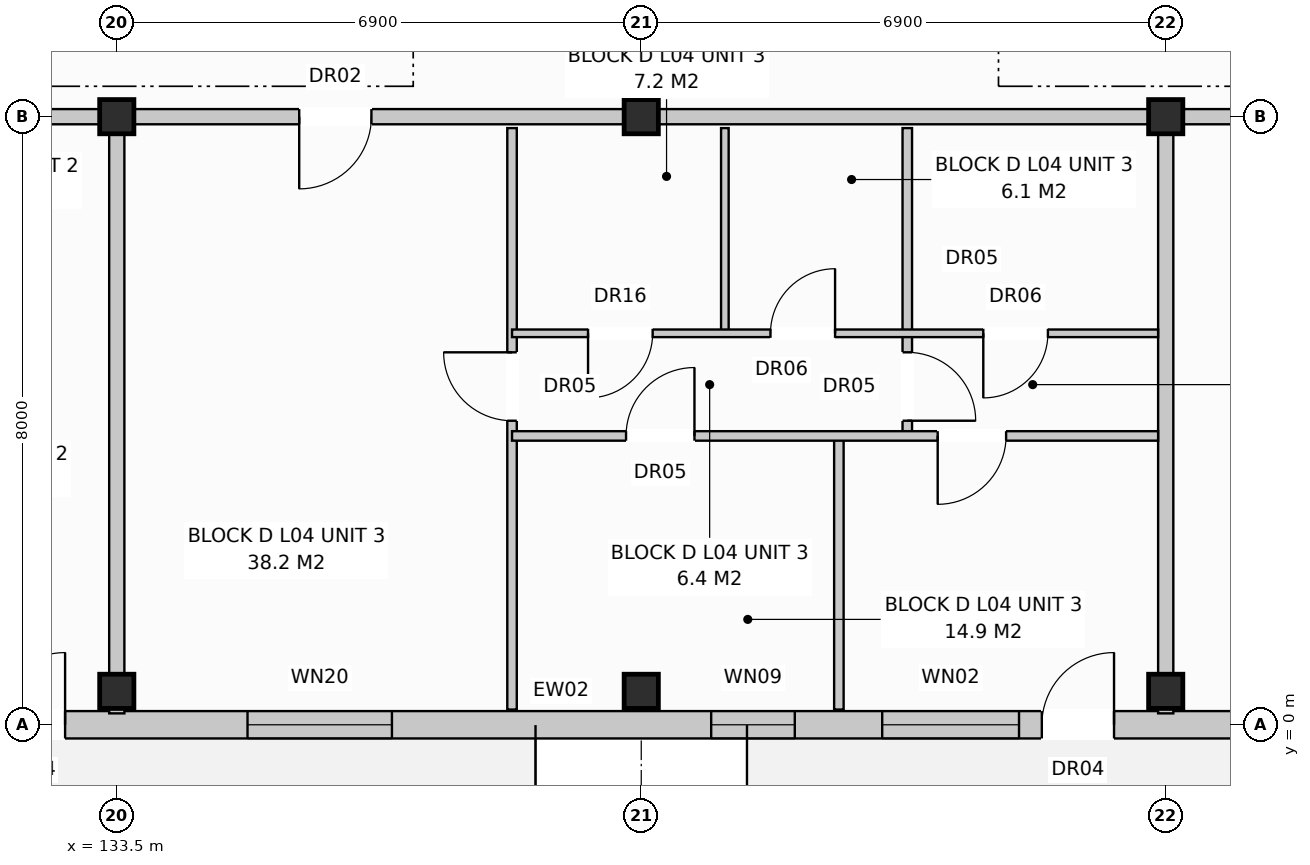
"""IFC4 building model, lengths in metres.
Left out: names, types, materials, properties, quantities, classifications, styles, units other than length and angle.
Written with IfcOpenShell. Run it as: python <this file> out.ifc"""

import sys

from ifc_helpers import new_model, si_unit, direction, frame, frame_2d, origin, origin_with_axes, origin_2d, place, context, subcontext, project, spatial, rectangle, extrude, element, fill, save


model = new_model("IFC4")
c1 = context("Model", 3, precision=1e-05, world=origin(), true_north=direction((0.0, 1.0)))
c2 = subcontext(c1, "Body", "Model", "MODEL_VIEW")
j1 = project(units=[si_unit("LENGTHUNIT", "METRE"), si_unit("PLANEANGLEUNIT", "RADIAN")], contexts=[c1])
p1 = place(None, origin())
s1 = spatial("IfcSite", under=j1, at=p1, CompositionType="ELEMENT")
p2 = place(p1, origin())
s2 = spatial("IfcBuilding", under=s1, at=p2, CompositionType="ELEMENT")
p3 = place(p2, frame((0.0, 0.0, 14.4)))
s3 = spatial("IfcBuildingStorey", under=s2, at=p3, CompositionType="ELEMENT", Elevation=14.4)
for number, where, z_axis, x_axis in (
    (1, (133.5, 0.44, 0.0), (0.0, 0.0, 1.0), (1.0, 0.0, 0.0)),
    (2, (133.5, 8.0, 0.0), (0.0, 0.0, 1.0), (1.0, 0.0, 0.0)),
    (3, (140.4, 0.44, 0.0), (0.0, 0.0, 1.0), (1.0, 0.0, 0.0)),
    (4, (140.4, 8.0, 0.0), (0.0, 0.0, 1.0), (1.0, 0.0, 0.0)),
    (5, (147.3, 0.44, 0.0), (0.0, 0.0, 1.0), (1.0, 0.0, 0.0)),
    (6, (147.3, 8.0, 0.0), (0.0, 0.0, 1.0), (1.0, 0.0, 0.0)),
):
    element("IfcColumn", number, at=place(p3, frame(where, z_axis=z_axis, x_axis=x_axis)), inside=s3, PredefinedType="COLUMN", context=c2, shape_type="SweptSolid", body=[
        extrude(rectangle(XDim=0.45, YDim=0.45, at=origin_2d()), origin(), (0.0, 0.0, 1.0), 3.2),
    ])
p4 = place(p3, frame((112.97, 0.0, 0.0), z_axis=(0.0, 0.0, 1.0), x_axis=(1.0, 0.0, 0.0)))
e7 = element("IfcWall", 7, at=p4, inside=s3, PredefinedType="STANDARD", context=c2, shape_type="SweptSolid", body=[
    extrude(rectangle(XDim=54.86, YDim=0.36, at=frame_2d((27.43, 0.0))), origin(), (0.0, 0.0, 1.0), 2.94),
])
p5 = place(p4, frame((5.127, 0.0, 0.0)))
e8 = element("IfcOpeningElement", 8, at=p5, cuts=e7, PredefinedType="OPENING", context=c2, shape_type="SweptSolid", body=[
    extrude(rectangle(XDim=0.95, YDim=2.1, at=frame_2d((0.475, 1.05))), frame((0.0, 0.192, 0.0), z_axis=(0.0, -1.0, 0.0), x_axis=(1.0, 0.0, 0.0)), (0.0, 0.0, 1.0), 0.384),
])
p6 = place(p4, frame((18.9, 0.0, 0.0)))
e9 = element("IfcOpeningElement", 9, at=p6, cuts=e7, PredefinedType="OPENING", context=c2, shape_type="SweptSolid", body=[
    extrude(rectangle(XDim=0.95, YDim=2.1, at=frame_2d((0.475, 1.05))), frame((0.0, 0.192, 0.0), z_axis=(0.0, -1.0, 0.0), x_axis=(1.0, 0.0, 0.0)), (0.0, 0.0, 1.0), 0.384),
])
p7 = place(p4, frame((32.7, 0.0, 0.0)))
e10 = element("IfcOpeningElement", 10, at=p7, cuts=e7, PredefinedType="OPENING", context=c2, shape_type="SweptSolid", body=[
    extrude(rectangle(XDim=0.95, YDim=2.1, at=frame_2d((0.475, 1.05))), frame((0.0, 0.192, 0.0), z_axis=(0.0, -1.0, 0.0), x_axis=(1.0, 0.0, 0.0)), (0.0, 0.0, 1.0), 0.384),
])
p8 = place(p4, frame((44.591, 0.0, 0.0)))
e11 = element("IfcOpeningElement", 11, at=p8, cuts=e7, PredefinedType="OPENING", context=c2, shape_type="SweptSolid", body=[
    extrude(rectangle(XDim=0.95, YDim=2.1, at=frame_2d((0.475, 1.05))), frame((0.0, 0.192, 0.0), z_axis=(0.0, -1.0, 0.0), x_axis=(1.0, 0.0, 0.0)), (0.0, 0.0, 1.0), 0.384),
])
p9 = place(p4, frame((0.9, 0.0, 0.8)))
e12 = element("IfcOpeningElement", 12, at=p9, cuts=e7, PredefinedType="OPENING", context=c2, shape_type="SweptSolid", body=[
    extrude(rectangle(XDim=1.8, YDim=1.7, at=frame_2d((0.9, 0.85))), frame((0.0, 0.192, 0.0), z_axis=(0.0, -1.0, 0.0), x_axis=(1.0, 0.0, 0.0)), (0.0, 0.0, 1.0), 0.384),
])
p10 = place(p4, frame((8.35, 0.0, 0.72)))
e13 = element("IfcOpeningElement", 13, at=p10, cuts=e7, PredefinedType="OPENING", context=c2, shape_type="SweptSolid", body=[
    extrude(rectangle(XDim=1.1, YDim=1.5, at=frame_2d((0.55, 0.75))), frame((0.0, 0.192, 0.0), z_axis=(0.0, -1.0, 0.0), x_axis=(1.0, 0.0, 0.0)), (0.0, 0.0, 1.0), 0.384),
])
p11 = place(p4, frame((11.225, 0.0, 0.8)))
e14 = element("IfcOpeningElement", 14, at=p11, cuts=e7, PredefinedType="OPENING", context=c2, shape_type="SweptSolid", body=[
    extrude(rectangle(XDim=1.95, YDim=1.65, at=frame_2d((0.975, 0.825))), frame((0.0, 0.192, 0.0), z_axis=(0.0, -1.0, 0.0), x_axis=(1.0, 0.0, 0.0)), (0.0, 0.0, 1.0), 0.384),
])
p12 = place(p4, frame((16.8, 0.0, 0.8)))
e15 = element("IfcOpeningElement", 15, at=p12, cuts=e7, PredefinedType="OPENING", context=c2, shape_type="SweptSolid", body=[
    extrude(rectangle(XDim=1.8, YDim=1.7, at=frame_2d((0.9, 0.85))), frame((0.0, 0.192, 0.0), z_axis=(0.0, -1.0, 0.0), x_axis=(1.0, 0.0, 0.0)), (0.0, 0.0, 1.0), 0.384),
])
p13 = place(p4, frame((22.25, 0.0, 0.72)))
e16 = element("IfcOpeningElement", 16, at=p13, cuts=e7, PredefinedType="OPENING", context=c2, shape_type="SweptSolid", body=[
    extrude(rectangle(XDim=1.9, YDim=1.85, at=frame_2d((0.95, 0.925))), frame((0.0, 0.192, 0.0), z_axis=(0.0, -1.0, 0.0), x_axis=(1.0, 0.0, 0.0)), (0.0, 0.0, 1.0), 0.384),
])
p14 = place(p4, frame((28.35, 0.0, 0.72)))
e17 = element("IfcOpeningElement", 17, at=p14, cuts=e7, PredefinedType="OPENING", context=c2, shape_type="SweptSolid", body=[
    extrude(rectangle(XDim=1.1, YDim=1.5, at=frame_2d((0.55, 0.75))), frame((0.0, 0.192, 0.0), z_axis=(0.0, -1.0, 0.0), x_axis=(1.0, 0.0, 0.0)), (0.0, 0.0, 1.0), 0.384),
])
p15 = place(p4, frame((30.6, 0.0, 0.8)))
e18 = element("IfcOpeningElement", 18, at=p15, cuts=e7, PredefinedType="OPENING", context=c2, shape_type="SweptSolid", body=[
    extrude(rectangle(XDim=1.8, YDim=1.7, at=frame_2d((0.9, 0.85))), frame((0.0, 0.192, 0.0), z_axis=(0.0, -1.0, 0.0), x_axis=(1.0, 0.0, 0.0)), (0.0, 0.0, 1.0), 0.384),
])
p16 = place(p4, frame((36.55, 0.0, 0.8)))
e19 = element("IfcOpeningElement", 19, at=p16, cuts=e7, PredefinedType="OPENING", context=c2, shape_type="SweptSolid", body=[
    extrude(rectangle(XDim=1.9, YDim=1.85, at=frame_2d((0.95, 0.925))), frame((0.0, 0.192, 0.0), z_axis=(0.0, -1.0, 0.0), x_axis=(1.0, 0.0, 0.0)), (0.0, 0.0, 1.0), 0.384),
])
p17 = place(p4, frame((42.65, 0.0, 0.72)))
e20 = element("IfcOpeningElement", 20, at=p17, cuts=e7, PredefinedType="OPENING", context=c2, shape_type="SweptSolid", body=[
    extrude(rectangle(XDim=1.1, YDim=1.5, at=frame_2d((0.55, 0.75))), frame((0.0, 0.192, 0.0), z_axis=(0.0, -1.0, 0.0), x_axis=(1.0, 0.0, 0.0)), (0.0, 0.0, 1.0), 0.384),
])
p18 = place(p4, frame((48.7, 0.0, 0.8)))
e21 = element("IfcOpeningElement", 21, at=p18, cuts=e7, PredefinedType="OPENING", context=c2, shape_type="SweptSolid", body=[
    extrude(rectangle(XDim=1.8, YDim=1.7, at=frame_2d((0.9, 0.85))), frame((0.0, 0.192, 0.0), z_axis=(0.0, -1.0, 0.0), x_axis=(1.0, 0.0, 0.0)), (0.0, 0.0, 1.0), 0.384),
])
p19 = place(p4, frame((52.45, 0.0, 0.72)))
e22 = element("IfcOpeningElement", 22, at=p19, cuts=e7, PredefinedType="OPENING", context=c2, shape_type="SweptSolid", body=[
    extrude(rectangle(XDim=1.1, YDim=1.5, at=frame_2d((0.55, 0.75))), frame((0.0, 0.192, 0.0), z_axis=(0.0, -1.0, 0.0), x_axis=(1.0, 0.0, 0.0)), (0.0, 0.0, 1.0), 0.384),
])
p20 = place(p3, frame((133.5, 7.85, 0.0), z_axis=(0.0, 0.0, 1.0), x_axis=(0.0, -1.0, 0.0)))
e23 = element("IfcWall", 23, at=p20, inside=s3, PredefinedType="PARTITIONING", context=c2, shape_type="SweptSolid", body=[
    extrude(rectangle(XDim=7.7, YDim=0.2, at=frame_2d((3.85, 0.0))), origin(), (0.0, 0.0, 1.0), 2.38),
])
p21 = place(p3, frame((119.7, 8.0, 0.0), z_axis=(0.0, 0.0, 1.0), x_axis=(1.0, 0.0, 0.0)))
e24 = element("IfcWall", 24, at=p21, inside=s3, PredefinedType="PARTITIONING", context=c2, shape_type="SweptSolid", body=[
    extrude(rectangle(XDim=13.8, YDim=0.2, at=frame_2d((6.9, 0.0))), origin(), (0.0, 0.0, 1.0), 2.38),
])
p22 = place(p21, frame((9.6, 0.0, 0.0)))
e25 = element("IfcOpeningElement", 25, at=p22, cuts=e24, PredefinedType="OPENING", context=c2, shape_type="SweptSolid", body=[
    extrude(rectangle(XDim=0.95, YDim=2.15, at=frame_2d((0.475, 1.075))), frame((0.0, 0.112, 0.0), z_axis=(0.0, -1.0, 0.0), x_axis=(1.0, 0.0, 0.0)), (0.0, 0.0, 1.0), 0.224),
])
p23 = place(p3, frame((147.3, 7.85, 0.0), z_axis=(0.0, 0.0, 1.0), x_axis=(0.0, -1.0, 0.0)))
e26 = element("IfcWall", 26, at=p23, inside=s3, PredefinedType="PARTITIONING", context=c2, shape_type="SweptSolid", body=[
    extrude(rectangle(XDim=7.7, YDim=0.2, at=frame_2d((3.85, 0.0))), origin(), (0.0, 0.0, 1.0), 2.94),
])
p24 = place(p3, frame((133.5, 8.0, 0.0), z_axis=(0.0, 0.0, 1.0), x_axis=(1.0, 0.0, 0.0)))
e27 = element("IfcWall", 27, at=p24, inside=s3, PredefinedType="PARTITIONING", context=c2, shape_type="SweptSolid", body=[
    extrude(rectangle(XDim=13.8, YDim=0.2, at=frame_2d((6.9, 0.0))), origin(), (0.0, 0.0, 1.0), 2.38),
])
p25 = place(p24, frame((2.4, 0.0, 0.0)))
e28 = element("IfcOpeningElement", 28, at=p25, cuts=e27, PredefinedType="OPENING", context=c2, shape_type="SweptSolid", body=[
    extrude(rectangle(XDim=0.95, YDim=2.15, at=frame_2d((0.475, 1.075))), frame((0.0, 0.112, 0.0), z_axis=(0.0, -1.0, 0.0), x_axis=(1.0, 0.0, 0.0)), (0.0, 0.0, 1.0), 0.224),
])
p26 = place(p3, frame((138.7, 7.85, 0.0), z_axis=(0.0, 0.0, 1.0), x_axis=(0.0, -1.0, 0.0)))
e29 = element("IfcWall", 29, at=p26, inside=s3, PredefinedType="PARTITIONING", context=c2, shape_type="SweptSolid", body=[
    extrude(rectangle(XDim=7.65, YDim=0.125, at=frame_2d((3.825, 0.0))), origin(), (0.0, 0.0, 1.0), 2.59),
])
p27 = place(p26, frame((2.95, 0.0, 0.0)))
e30 = element("IfcOpeningElement", 30, at=p27, cuts=e29, PredefinedType="OPENING", context=c2, shape_type="SweptSolid", body=[
    extrude(rectangle(XDim=0.9, YDim=2.1, at=frame_2d((0.45, 1.05))), frame((0.0, 0.074, 0.0), z_axis=(0.0, -1.0, 0.0), x_axis=(1.0, 0.0, 0.0)), (0.0, 0.0, 1.0), 0.149),
])
p28 = place(p3, frame((141.5, 7.85, 0.0), z_axis=(0.0, 0.0, 1.0), x_axis=(0.0, -1.0, 0.0)))
e31 = element("IfcWall", 31, at=p28, inside=s3, PredefinedType="PARTITIONING", context=c2, shape_type="SweptSolid", body=[
    extrude(rectangle(XDim=2.7, YDim=0.1, at=frame_2d((1.35, 0.0))), origin(), (0.0, 0.0, 1.0), 2.59),
])
p29 = place(p3, frame((143.9, 7.85, 0.0), z_axis=(0.0, 0.0, 1.0), x_axis=(0.0, -1.0, 0.0)))
e32 = element("IfcWall", 32, at=p29, inside=s3, PredefinedType="PARTITIONING", context=c2, shape_type="SweptSolid", body=[
    extrude(rectangle(XDim=4.05, YDim=0.125, at=frame_2d((2.025, 0.0))), origin(), (0.0, 0.0, 1.0), 2.94),
])
p30 = place(p29, frame((2.95, 0.0, 0.0)))
e33 = element("IfcOpeningElement", 33, at=p30, cuts=e32, PredefinedType="OPENING", context=c2, shape_type="SweptSolid", body=[
    extrude(rectangle(XDim=0.9, YDim=2.1, at=frame_2d((0.45, 1.05))), frame((0.0, 0.074, 0.0), z_axis=(0.0, -1.0, 0.0), x_axis=(1.0, 0.0, 0.0)), (0.0, 0.0, 1.0), 0.149),
])
p31 = place(p3, frame((143.0, 3.8, 0.0), z_axis=(0.0, 0.0, 1.0), x_axis=(0.0, -1.0, 0.0)))
e34 = element("IfcWall", 34, at=p31, inside=s3, PredefinedType="PARTITIONING", context=c2, shape_type="SweptSolid", body=[
    extrude(rectangle(XDim=3.6, YDim=0.125, at=frame_2d((1.8, 0.0))), origin(), (0.0, 0.0, 1.0), 2.94),
])
p32 = place(p3, frame((138.7, 5.15, 0.0), z_axis=(0.0, 0.0, 1.0), x_axis=(1.0, 0.0, 0.0)))
e35 = element("IfcWall", 35, at=p32, inside=s3, PredefinedType="PARTITIONING", context=c2, shape_type="SweptSolid", body=[
    extrude(rectangle(XDim=8.5, YDim=0.1, at=frame_2d((4.25, 0.0))), origin(), (0.0, 0.0, 1.0), 2.94),
])
p33 = place(p32, frame((1.0, 0.0, 0.0)))
e36 = element("IfcOpeningElement", 36, at=p33, cuts=e35, PredefinedType="OPENING", context=c2, shape_type="SweptSolid", body=[
    extrude(rectangle(XDim=0.85, YDim=2.1, at=frame_2d((0.425, 1.05))), frame((0.0, 0.062, 0.0), z_axis=(0.0, -1.0, 0.0), x_axis=(1.0, 0.0, 0.0)), (0.0, 0.0, 1.0), 0.124),
])
p34 = place(p32, frame((3.4, 0.0, 0.0)))
e37 = element("IfcOpeningElement", 37, at=p34, cuts=e35, PredefinedType="OPENING", context=c2, shape_type="SweptSolid", body=[
    extrude(rectangle(XDim=0.85, YDim=2.05, at=frame_2d((0.425, 1.025))), frame((0.0, 0.062, 0.0), z_axis=(0.0, -1.0, 0.0), x_axis=(1.0, 0.0, 0.0)), (0.0, 0.0, 1.0), 0.124),
])
p35 = place(p32, frame((6.2, 0.0, 0.0)))
e38 = element("IfcOpeningElement", 38, at=p35, cuts=e35, PredefinedType="OPENING", context=c2, shape_type="SweptSolid", body=[
    extrude(rectangle(XDim=0.85, YDim=2.05, at=frame_2d((0.425, 1.025))), frame((0.0, 0.062, 0.0), z_axis=(0.0, -1.0, 0.0), x_axis=(1.0, 0.0, 0.0)), (0.0, 0.0, 1.0), 0.124),
])
p36 = place(p3, frame((138.7, 3.8, 0.0), z_axis=(0.0, 0.0, 1.0), x_axis=(1.0, 0.0, 0.0)))
e39 = element("IfcWall", 39, at=p36, inside=s3, PredefinedType="PARTITIONING", context=c2, shape_type="SweptSolid", body=[
    extrude(rectangle(XDim=8.5, YDim=0.125, at=frame_2d((4.25, 0.0))), origin(), (0.0, 0.0, 1.0), 2.94),
])
p37 = place(p36, frame((1.5, 0.0, 0.0)))
e40 = element("IfcOpeningElement", 40, at=p37, cuts=e39, PredefinedType="OPENING", context=c2, shape_type="SweptSolid", body=[
    extrude(rectangle(XDim=0.9, YDim=2.1, at=frame_2d((0.45, 1.05))), frame((0.0, 0.074, 0.0), z_axis=(0.0, -1.0, 0.0), x_axis=(1.0, 0.0, 0.0)), (0.0, 0.0, 1.0), 0.149),
])
p38 = place(p36, frame((5.6, 0.0, 0.0)))
e41 = element("IfcOpeningElement", 41, at=p38, cuts=e39, PredefinedType="OPENING", context=c2, shape_type="SweptSolid", body=[
    extrude(rectangle(XDim=0.9, YDim=2.1, at=frame_2d((0.45, 1.05))), frame((0.0, 0.074, 0.0), z_axis=(0.0, -1.0, 0.0), x_axis=(1.0, 0.0, 0.0)), (0.0, 0.0, 1.0), 0.149),
])
p39 = place(p3, frame((147.3, 8.0, 0.0), z_axis=(0.0, 0.0, 1.0), x_axis=(1.0, 0.0, 0.0)))
e42 = element("IfcWall", 42, at=p39, inside=s3, PredefinedType="PARTITIONING", context=c2, shape_type="SweptSolid", body=[
    extrude(rectangle(XDim=20.7, YDim=0.2, at=frame_2d((10.35, 0.0))), origin(), (0.0, 0.0, 1.0), 2.38),
])
p40 = place(p39, frame((2.4, 0.0, 0.0)))
e43 = element("IfcOpeningElement", 43, at=p40, cuts=e42, PredefinedType="OPENING", context=c2, shape_type="SweptSolid", body=[
    extrude(rectangle(XDim=0.95, YDim=2.15, at=frame_2d((0.475, 1.075))), frame((0.0, 0.112, 0.0), z_axis=(0.0, -1.0, 0.0), x_axis=(1.0, 0.0, 0.0)), (0.0, 0.0, 1.0), 0.224),
])
p41 = place(p6, origin_with_axes())
e44 = element("IfcDoor", 44, at=p41, inside=s3, OperationType="SINGLE_SWING_RIGHT", PredefinedType="DOOR", context=c2, shape_type="SweptSolid", body=[
    extrude(rectangle(XDim=0.95, YDim=2.1, at=frame_2d((0.475, 1.05))), frame((0.0, 0.025, 0.0), z_axis=(0.0, -1.0, 0.0), x_axis=(1.0, 0.0, 0.0)), (0.0, 0.0, 1.0), 0.05),
])
fill(e9, e44)
p42 = place(p7, origin_with_axes())
e45 = element("IfcDoor", 45, at=p42, inside=s3, OperationType="SINGLE_SWING_RIGHT", PredefinedType="DOOR", context=c2, shape_type="SweptSolid", body=[
    extrude(rectangle(XDim=0.95, YDim=2.1, at=frame_2d((0.475, 1.05))), frame((0.0, 0.025, 0.0), z_axis=(0.0, -1.0, 0.0), x_axis=(1.0, 0.0, 0.0)), (0.0, 0.0, 1.0), 0.05),
])
fill(e10, e45)
p43 = place(p13, origin_with_axes())
e46 = element("IfcWindow", 46, at=p43, inside=s3, PartitioningType="SINGLE_PANEL", PredefinedType="WINDOW", context=c2, shape_type="SweptSolid", body=[
    extrude(rectangle(XDim=1.9, YDim=1.85, at=frame_2d((0.95, 0.925))), frame((0.0, 0.03, 0.0), z_axis=(0.0, -1.0, 0.0), x_axis=(1.0, 0.0, 0.0)), (0.0, 0.0, 1.0), 0.06),
])
fill(e16, e46)
p44 = place(p14, origin_with_axes())
e47 = element("IfcWindow", 47, at=p44, inside=s3, PartitioningType="SINGLE_PANEL", PredefinedType="WINDOW", context=c2, shape_type="SweptSolid", body=[
    extrude(rectangle(XDim=1.1, YDim=1.5, at=frame_2d((0.55, 0.75))), frame((0.0, 0.03, 0.0), z_axis=(0.0, -1.0, 0.0), x_axis=(1.0, 0.0, 0.0)), (0.0, 0.0, 1.0), 0.06),
])
fill(e17, e47)
p45 = place(p15, origin_with_axes())
e48 = element("IfcWindow", 48, at=p45, inside=s3, PartitioningType="SINGLE_PANEL", PredefinedType="WINDOW", context=c2, shape_type="SweptSolid", body=[
    extrude(rectangle(XDim=1.8, YDim=1.7, at=frame_2d((0.9, 0.85))), frame((0.0, 0.03, 0.0), z_axis=(0.0, -1.0, 0.0), x_axis=(1.0, 0.0, 0.0)), (0.0, 0.0, 1.0), 0.06),
])
fill(e18, e48)
p46 = place(p25, frame((0.95, 0.0, 0.0), z_axis=(0.0, 0.0, 1.0), x_axis=(-1.0, 0.0, 0.0)))
e49 = element("IfcDoor", 49, at=p46, inside=s3, OperationType="SINGLE_SWING_LEFT", PredefinedType="DOOR", context=c2, shape_type="SweptSolid", body=[
    extrude(rectangle(XDim=0.95, YDim=2.15, at=frame_2d((0.475, 1.075))), frame((0.0, 0.025, 0.0), z_axis=(0.0, -1.0, 0.0), x_axis=(1.0, 0.0, 0.0)), (0.0, 0.0, 1.0), 0.05),
])
fill(e28, e49)
p47 = place(p27, frame((0.9, 0.0, 0.0), z_axis=(0.0, 0.0, 1.0), x_axis=(-1.0, 0.0, 0.0)))
e50 = element("IfcDoor", 50, at=p47, inside=s3, OperationType="SINGLE_SWING_LEFT", PredefinedType="DOOR", context=c2, shape_type="SweptSolid", body=[
    extrude(rectangle(XDim=0.9, YDim=2.1, at=frame_2d((0.45, 1.05))), frame((0.0, 0.025, 0.0), z_axis=(0.0, -1.0, 0.0), x_axis=(1.0, 0.0, 0.0)), (0.0, 0.0, 1.0), 0.05),
])
fill(e30, e50)
p48 = place(p30, origin_with_axes())
e51 = element("IfcDoor", 51, at=p48, inside=s3, OperationType="SINGLE_SWING_RIGHT", PredefinedType="DOOR", context=c2, shape_type="SweptSolid", body=[
    extrude(rectangle(XDim=0.9, YDim=2.1, at=frame_2d((0.45, 1.05))), frame((0.0, 0.025, 0.0), z_axis=(0.0, -1.0, 0.0), x_axis=(1.0, 0.0, 0.0)), (0.0, 0.0, 1.0), 0.05),
])
fill(e33, e51)
p49 = place(p33, frame((0.85, 0.0, 0.0), z_axis=(0.0, 0.0, 1.0), x_axis=(-1.0, 0.0, 0.0)))
e52 = element("IfcDoor", 52, at=p49, inside=s3, OperationType="SINGLE_SWING_LEFT", PredefinedType="DOOR", context=c2, shape_type="SweptSolid", body=[
    extrude(rectangle(XDim=0.85, YDim=2.1, at=frame_2d((0.425, 1.05))), frame((0.0, 0.025, 0.0), z_axis=(0.0, -1.0, 0.0), x_axis=(1.0, 0.0, 0.0)), (0.0, 0.0, 1.0), 0.05),
])
fill(e36, e52)
p50 = place(p34, origin_with_axes())
e53 = element("IfcDoor", 53, at=p50, inside=s3, OperationType="SINGLE_SWING_RIGHT", PredefinedType="DOOR", context=c2, shape_type="SweptSolid", body=[
    extrude(rectangle(XDim=0.85, YDim=2.05, at=frame_2d((0.425, 1.025))), frame((0.0, 0.025, 0.0), z_axis=(0.0, -1.0, 0.0), x_axis=(1.0, 0.0, 0.0)), (0.0, 0.0, 1.0), 0.05),
])
fill(e37, e53)
p51 = place(p35, frame((0.85, 0.0, 0.0), z_axis=(0.0, 0.0, 1.0), x_axis=(-1.0, 0.0, 0.0)))
e54 = element("IfcDoor", 54, at=p51, inside=s3, OperationType="SINGLE_SWING_LEFT", PredefinedType="DOOR", context=c2, shape_type="SweptSolid", body=[
    extrude(rectangle(XDim=0.85, YDim=2.05, at=frame_2d((0.425, 1.025))), frame((0.0, 0.025, 0.0), z_axis=(0.0, -1.0, 0.0), x_axis=(1.0, 0.0, 0.0)), (0.0, 0.0, 1.0), 0.05),
])
fill(e38, e54)
p52 = place(p37, origin_with_axes())
e55 = element("IfcDoor", 55, at=p52, inside=s3, OperationType="SINGLE_SWING_RIGHT", PredefinedType="DOOR", context=c2, shape_type="SweptSolid", body=[
    extrude(rectangle(XDim=0.9, YDim=2.1, at=frame_2d((0.45, 1.05))), frame((0.0, 0.025, 0.0), z_axis=(0.0, -1.0, 0.0), x_axis=(1.0, 0.0, 0.0)), (0.0, 0.0, 1.0), 0.05),
])
fill(e40, e55)
p53 = place(p38, frame((0.9, 0.0, 0.0), z_axis=(0.0, 0.0, 1.0), x_axis=(-1.0, 0.0, 0.0)))
e56 = element("IfcDoor", 56, at=p53, inside=s3, OperationType="SINGLE_SWING_LEFT", PredefinedType="DOOR", context=c2, shape_type="SweptSolid", body=[
    extrude(rectangle(XDim=0.9, YDim=2.1, at=frame_2d((0.45, 1.05))), frame((0.0, 0.025, 0.0), z_axis=(0.0, -1.0, 0.0), x_axis=(1.0, 0.0, 0.0)), (0.0, 0.0, 1.0), 0.05),
])
fill(e41, e56)
save(model, sys.argv[1])
